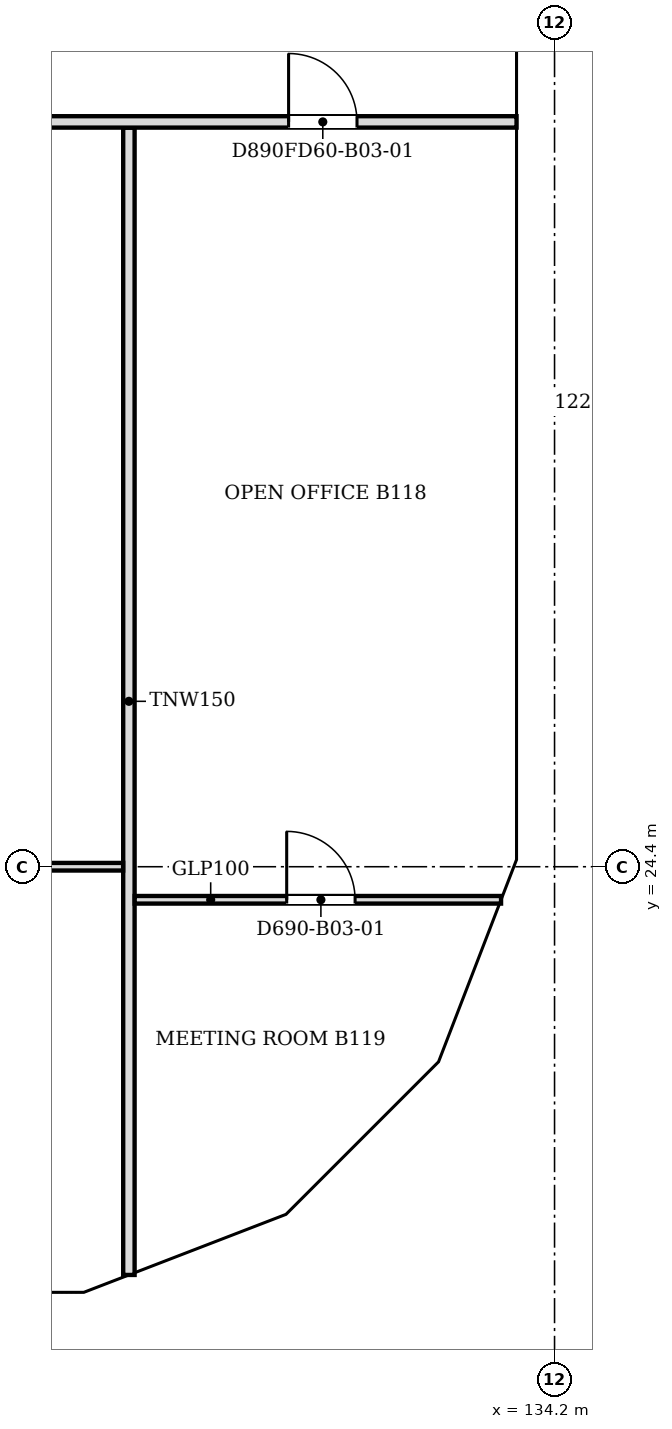
"""IFC4 building model, lengths in metres.
Left out: names, types, materials, properties, quantities, classifications, styles, units other than length and angle.
Written with IfcOpenShell. Run it as: python <this file> out.ifc"""

import sys

from ifc_helpers import new_model, si_unit, direction, frame, frame_2d, origin, place, context, subcontext, project, spatial, polyline, rectangle, outline, extrude, faceted_brep, source, transform, mapped, element, fill, save


model = new_model("IFC4")
c1 = context("Model", 3, precision=1e-05, world=origin(), true_north=direction((0.0, 1.0)))
c2 = subcontext(c1, "Body", "Model", "MODEL_VIEW")
j1 = project(units=[si_unit("LENGTHUNIT", "METRE"), si_unit("PLANEANGLEUNIT", "RADIAN")], contexts=[c1])
p1 = place(None, origin())
s1 = spatial("IfcSite", under=j1, at=p1, CompositionType="ELEMENT")
p2 = place(p1, origin())
s2 = spatial("IfcBuilding", under=s1, at=p2, CompositionType="ELEMENT")
p3 = place(p2, frame((0.0, 0.0, 25.8)))
s3 = spatial("IfcBuildingStorey", under=s2, at=p3, CompositionType="ELEMENT", Elevation=25.8)
m1 = source(origin(), c2, "Body", "Brep", [
    faceted_brep([(3.05, -0.25, 3.74), (3.003, -0.25, 3.8), (0.0, -0.25, 0.0), (3.05, -0.25, 0.0), (0.0, 0.25, 0.0), (2.957, 0.25, 3.741), (2.957, 0.25, 0.0), (3.003, 0.0, 3.8)], [[[0, 1, 2, 3]], [[4, 5, 6]], [[7, 1, 0]], [[5, 4, 2, 1, 7]], [[4, 6, 3, 2]], [[3, 6, 5, 7, 0]]]),
])
p4 = place(p3, frame((125.05, 18.55, 0.0), z_axis=(0.0, 0.0, 1.0), x_axis=(1.0, 0.0, 0.0)))
e1 = element("IfcWall", 1, at=p4, inside=s3, PredefinedType="SOLIDWALL", context=c2, shape_type="MappedRepresentation", body=[
    mapped(m1, transform((0.0, 0.0, 0.0), scale=1.0)),
])
m2 = source(origin(), c2, "Body", "SweptSolid", [
    extrude(outline(polyline([(2.803, 3.144), (0.516, 0.25), (2.803, 0.25), (2.803, 3.144)])), frame((0.0, 0.26, 0.0), z_axis=(0.0, -1.0, 0.0), x_axis=(1.0, 0.0, 0.0)), (0.0, 0.0, 1.0), 0.52),
])
p5 = place(p4, origin())
e2 = element("IfcOpeningElement", 2, at=p5, cuts=e1, PredefinedType="OPENING", context=c2, shape_type="MappedRepresentation", body=[
    mapped(m2, transform((0.0, 0.0, 0.0), scale=1.0)),
])
m3 = source(origin(), c2, "Body", "Brep", [
    faceted_brep([(2.997, -0.25, 0.0), (0.047, -0.25, 3.8), (0.0, -0.25, 3.741), (0.0, -0.25, 0.0), (0.093, 0.25, 3.74), (2.944, 0.25, 0.068), (2.944, 0.25, 0.0), (0.093, 0.25, 0.0), (0.047, 0.0, 3.8), (2.997, 0.0, 0.0)], [[[0, 1, 2, 3]], [[4, 5, 6, 7]], [[5, 4, 8, 1, 0, 9]], [[2, 1, 8]], [[7, 6, 9, 0, 3]], [[7, 3, 2, 8, 4]], [[9, 6, 5]]]),
])
p6 = place(p3, frame((128.01, 18.533, 0.0), z_axis=(0.0, 0.0, 1.0), x_axis=(0.932990326376, 0.359901446078, 0.0)))
e3 = element("IfcWall", 3, at=p6, inside=s3, PredefinedType="SOLIDWALL", context=c2, shape_type="MappedRepresentation", body=[
    mapped(m3, transform((0.0, 0.0, 0.0), scale=1.0)),
])
m4 = source(origin(), c2, "Body", "SweptSolid", [
    extrude(outline(polyline([(2.487, 0.25), (0.247, 3.135), (0.247, 0.25), (2.487, 0.25)])), frame((0.0, 0.26, 0.0), z_axis=(0.0, -1.0, 0.0), x_axis=(1.0, 0.0, 0.0)), (0.0, 0.0, 1.0), 0.52),
])
p7 = place(p6, origin())
e4 = element("IfcOpeningElement", 4, at=p7, cuts=e3, PredefinedType="OPENING", context=c2, shape_type="MappedRepresentation", body=[
    mapped(m4, transform((0.0, 0.0, 0.0), scale=1.0)),
])
m5 = source(origin(), c2, "Body", "Brep", [
    faceted_brep([(2.997, -0.25, 3.732), (2.944, -0.25, 3.8), (0.0, -0.25, 0.0), (2.997, -0.25, 0.0), (0.053, 0.25, 0.068), (2.891, 0.25, 3.732), (2.891, 0.25, 0.0), (0.053, 0.25, 0.0), (2.944, 0.0, 3.8), (0.0, 0.0, 0.0)], [[[0, 1, 2, 3]], [[4, 5, 6, 7]], [[8, 1, 0]], [[5, 4, 9, 2, 1, 8]], [[7, 6, 3, 2, 9]], [[7, 9, 4]], [[3, 6, 5, 8, 0]]]),
])
p8 = place(p3, frame((130.806, 19.612, 0.0), z_axis=(0.0, 0.0, 1.0), x_axis=(0.707106781187, 0.707106781187, 0.0)))
e5 = element("IfcWall", 5, at=p8, inside=s3, PredefinedType="SOLIDWALL", context=c2, shape_type="MappedRepresentation", body=[
    mapped(m5, transform((0.0, 0.0, 0.0), scale=1.0)),
])
m6 = source(origin(), c2, "Body", "SweptSolid", [
    extrude(outline(polyline([(2.744, 3.134), (0.51, 0.25), (2.744, 0.25), (2.744, 3.134)])), frame((0.0, 0.26, 0.0), z_axis=(0.0, -1.0, 0.0), x_axis=(1.0, 0.0, 0.0)), (0.0, 0.0, 1.0), 0.52),
])
p9 = place(p8, origin())
e6 = element("IfcOpeningElement", 6, at=p9, cuts=e5, PredefinedType="OPENING", context=c2, shape_type="MappedRepresentation", body=[
    mapped(m6, transform((0.0, 0.0, 0.0), scale=1.0)),
])
m7 = source(origin(), c2, "Body", "Brep", [
    faceted_brep([(3.003, -0.25, 0.0), (0.053, -0.25, 3.8), (0.0, -0.25, 3.732), (0.0, -0.25, 0.0), (0.106, 0.25, 3.732), (2.957, 0.25, 0.06), (2.957, 0.25, 0.0), (0.106, 0.25, 0.0), (0.053, 0.0, 3.8), (3.003, 0.0, 0.0)], [[[0, 1, 2, 3]], [[4, 5, 6, 7]], [[5, 4, 8, 1, 0, 9]], [[2, 1, 8]], [[7, 6, 9, 0, 3]], [[7, 3, 2, 8, 4]], [[9, 6, 5]]]),
])
p10 = place(p3, frame((132.869, 21.644, 0.0), z_axis=(0.0, 0.0, 1.0), x_axis=(0.359855894603, 0.933007896601, 0.0)))
e7 = element("IfcWall", 7, at=p10, inside=s3, PredefinedType="SOLIDWALL", context=c2, shape_type="MappedRepresentation", body=[
    mapped(m7, transform((0.0, 0.0, 0.0), scale=1.0)),
])
m8 = source(origin(), c2, "Body", "SweptSolid", [
    extrude(outline(polyline([(2.493, 0.25), (0.253, 3.135), (0.253, 0.25), (2.493, 0.25)])), frame((0.0, 0.26, 0.0), z_axis=(0.0, -1.0, 0.0), x_axis=(1.0, 0.0, 0.0)), (0.0, 0.0, 1.0), 0.52),
])
p11 = place(p10, origin())
e8 = element("IfcOpeningElement", 8, at=p11, cuts=e7, PredefinedType="OPENING", context=c2, shape_type="MappedRepresentation", body=[
    mapped(m8, transform((0.0, 0.0, 0.0), scale=1.0)),
])
m9 = source(origin(), c2, "Body", "Brep", [
    faceted_brep([(6.053, -0.25, 0.0), (3.003, -0.25, 3.8), (0.0, -0.25, 0.0), (0.047, 0.25, 0.059), (3.003, 0.25, 3.8), (6.053, 0.25, 0.0), (0.047, 0.25, 0.0), (0.0, 0.0, 0.0)], [[[0, 1, 2]], [[3, 4, 5, 6]], [[5, 4, 1, 0]], [[4, 3, 7, 2, 1]], [[6, 5, 0, 2, 7]], [[6, 7, 3]]]),
])
p12 = place(p3, frame((133.95, 24.447, 0.0), z_axis=(0.0, 0.0, 1.0), x_axis=(0.0, 1.0, 0.0)))
e9 = element("IfcWall", 9, at=p12, inside=s3, PredefinedType="SOLIDWALL", context=c2, shape_type="MappedRepresentation", body=[
    mapped(m9, transform((0.0, 0.0, 0.0), scale=1.0)),
])
m10 = source(origin(), c2, "Body", "SweptSolid", [
    extrude(outline(polyline([(5.532, 0.25), (3.005, 3.399), (0.516, 0.25), (5.532, 0.25)])), frame((0.0, 0.26, 0.0), z_axis=(0.0, -1.0, 0.0), x_axis=(1.0, 0.0, 0.0)), (0.0, 0.0, 1.0), 0.52),
])
p13 = place(p12, origin())
e10 = element("IfcOpeningElement", 10, at=p13, cuts=e9, PredefinedType="OPENING", context=c2, shape_type="MappedRepresentation", body=[
    mapped(m10, transform((0.0, 0.0, 0.0), scale=1.0)),
])
m11 = source(origin(), c2, "Body", "SweptSolid", [
    extrude(outline(polyline([(6.1, 0.0), (3.05, 3.8), (0.0, 0.0), (6.1, 0.0)])), frame((0.0, 0.25, 0.0), z_axis=(0.0, -1.0, 0.0), x_axis=(1.0, 0.0, 0.0)), (0.0, 0.0, 1.0), 0.5),
])
p14 = place(p3, frame((133.95, 30.5, 0.0), z_axis=(0.0, 0.0, 1.0), x_axis=(0.0, 1.0, 0.0)))
e11 = element("IfcWall", 11, at=p14, inside=s3, PredefinedType="SOLIDWALL", context=c2, shape_type="MappedRepresentation", body=[
    mapped(m11, transform((0.0, 0.0, 0.0), scale=1.0)),
])
m12 = source(origin(), c2, "Body", "SweptSolid", [
    extrude(outline(polyline([(5.579, 0.25), (3.05, 3.401), (0.521, 0.25), (5.579, 0.25)])), frame((0.0, 0.26, 0.0), z_axis=(0.0, -1.0, 0.0), x_axis=(1.0, 0.0, 0.0)), (0.0, 0.0, 1.0), 0.52),
])
p15 = place(p14, origin())
e12 = element("IfcOpeningElement", 12, at=p15, cuts=e11, PredefinedType="OPENING", context=c2, shape_type="MappedRepresentation", body=[
    mapped(m12, transform((0.0, 0.0, 0.0), scale=1.0)),
])
p16 = place(p2, frame((0.0, 0.0, 29.6)))
s4 = spatial("IfcBuildingStorey", under=s2, at=p16, CompositionType="ELEMENT", Elevation=29.6)
m13 = source(origin(), c2, "Body", "Brep", [
    faceted_brep([(3.05, -0.25, 0.0), (6.053, -0.25, 3.8), (3.05, -0.25, 7.6), (0.0, -0.25, 3.8), (0.0, 0.25, 3.8), (3.05, 0.25, 7.6), (6.007, 0.25, 3.859), (6.007, 0.25, 3.741), (3.05, 0.25, 0.0), (6.053, 0.0, 3.8)], [[[0, 1, 2, 3]], [[4, 5, 6, 7, 8]], [[8, 7, 9, 1, 0]], [[6, 5, 2, 1, 9]], [[5, 4, 3, 2]], [[4, 8, 0, 3]], [[7, 6, 9]]]),
])
p17 = place(p16, frame((122.0, 18.55, -3.8), z_axis=(0.0, 0.0, 1.0), x_axis=(1.0, 0.0, 0.0)))
e13 = element("IfcWall", 13, at=p17, inside=s4, PredefinedType="SOLIDWALL", context=c2, shape_type="MappedRepresentation", body=[
    mapped(m13, transform((0.0, 0.0, 0.0), scale=1.0)),
])
m14 = source(origin(), c2, "Body", "SweptSolid", [
    extrude(outline(polyline([(3.049, 0.401), (5.735, 3.8), (3.049, 7.199), (0.321, 3.8), (3.049, 0.401)])), frame((0.0, 0.26, 0.0), z_axis=(0.0, -1.0, 0.0), x_axis=(1.0, 0.0, 0.0)), (0.0, 0.0, 1.0), 0.52),
])
p18 = place(p17, origin())
e14 = element("IfcOpeningElement", 14, at=p18, cuts=e13, PredefinedType="OPENING", context=c2, shape_type="MappedRepresentation", body=[
    mapped(m14, transform((0.0, 0.0, 0.0), scale=1.0)),
])
m15 = source(origin(), c2, "Body", "Brep", [
    faceted_brep([(2.95, -0.25, 0.0), (3.003, -0.25, 0.068), (3.003, -0.25, 7.531), (2.95, -0.25, 7.6), (0.0, -0.25, 3.8), (0.047, 0.25, 3.86), (2.898, 0.25, 7.532), (2.898, 0.25, 0.068), (0.047, 0.25, 3.74), (2.95, 0.0, 0.0), (2.95, 0.0, 7.6), (0.0, 0.0, 3.8)], [[[0, 1, 2, 3, 4]], [[5, 6, 7, 8]], [[1, 0, 9]], [[10, 3, 2]], [[6, 5, 11, 4, 3, 10]], [[8, 7, 9, 0, 4, 11]], [[8, 11, 5]], [[1, 9, 7, 6, 10, 2]]]),
])
p19 = place(p16, frame((128.053, 18.55, -3.8), z_axis=(0.0, 0.0, 1.0), x_axis=(0.933007896601, 0.359855894603, 0.0)))
e15 = element("IfcWall", 15, at=p19, inside=s4, PredefinedType="SOLIDWALL", context=c2, shape_type="MappedRepresentation", body=[
    mapped(m15, transform((0.0, 0.0, 0.0), scale=1.0)),
])
m16 = source(origin(), c2, "Body", "SweptSolid", [
    extrude(outline(polyline([(2.75, 6.935), (0.316, 3.8), (2.75, 0.665), (2.75, 6.935)])), frame((0.0, 0.26, 0.0), z_axis=(0.0, -1.0, 0.0), x_axis=(1.0, 0.0, 0.0)), (0.0, 0.0, 1.0), 0.52),
])
p20 = place(p19, origin())
e16 = element("IfcOpeningElement", 16, at=p20, cuts=e15, PredefinedType="OPENING", context=c2, shape_type="MappedRepresentation", body=[
    mapped(m16, transform((0.0, 0.0, 0.0), scale=1.0)),
])
m17 = source(origin(), c2, "Body", "Brep", [
    faceted_brep([(0.053, -0.25, 0.0), (2.997, -0.25, 3.8), (0.053, -0.25, 7.6), (0.0, -0.25, 7.532), (0.0, -0.25, 0.068), (0.106, 0.25, 7.531), (2.944, 0.25, 3.868), (2.944, 0.25, 3.732), (0.106, 0.25, 0.068), (2.997, 0.0, 3.8), (0.053, 0.0, 0.0), (0.053, 0.0, 7.6)], [[[0, 1, 2, 3, 4]], [[5, 6, 7, 8]], [[8, 7, 9, 1, 0, 10]], [[6, 5, 11, 2, 1, 9]], [[3, 2, 11]], [[10, 0, 4]], [[8, 10, 4, 3, 11, 5]], [[7, 6, 9]]]),
])
p21 = place(p16, frame((130.769, 19.574, -3.8), z_axis=(0.0, 0.0, 1.0), x_axis=(0.707106781187, 0.707106781187, 0.0)))
e17 = element("IfcWall", 17, at=p21, inside=s4, PredefinedType="SOLIDWALL", context=c2, shape_type="MappedRepresentation", body=[
    mapped(m17, transform((0.0, 0.0, 0.0), scale=1.0)),
])
m18 = source(origin(), c2, "Body", "SweptSolid", [
    extrude(outline(polyline([(0.253, 0.666), (2.681, 3.8), (0.253, 6.934), (0.253, 0.666)])), frame((0.0, 0.26, 0.0), z_axis=(0.0, -1.0, 0.0), x_axis=(1.0, 0.0, 0.0)), (0.0, 0.0, 1.0), 0.52),
])
p22 = place(p21, origin())
e18 = element("IfcOpeningElement", 18, at=p22, cuts=e17, PredefinedType="OPENING", context=c2, shape_type="MappedRepresentation", body=[
    mapped(m18, transform((0.0, 0.0, 0.0), scale=1.0)),
])
m19 = source(origin(), c2, "Body", "Brep", [
    faceted_brep([(2.95, -0.25, 0.0), (2.997, -0.25, 0.059), (2.997, -0.25, 7.541), (2.95, -0.25, 7.6), (0.0, -0.25, 3.8), (0.053, 0.25, 3.868), (2.904, 0.25, 7.54), (2.904, 0.25, 0.06), (0.053, 0.25, 3.732), (2.95, 0.0, 0.0), (2.95, 0.0, 7.6), (0.0, 0.0, 3.8)], [[[0, 1, 2, 3, 4]], [[5, 6, 7, 8]], [[1, 0, 9]], [[10, 3, 2]], [[6, 5, 11, 4, 3, 10]], [[8, 7, 9, 0, 4, 11]], [[8, 11, 5]], [[1, 9, 7, 6, 10, 2]]]),
])
p23 = place(p16, frame((132.888, 21.694, -3.8), z_axis=(0.0, 0.0, 1.0), x_axis=(0.359901446078, 0.932990326376, 0.0)))
e19 = element("IfcWall", 19, at=p23, inside=s4, PredefinedType="SOLIDWALL", context=c2, shape_type="MappedRepresentation", body=[
    mapped(m19, transform((0.0, 0.0, 0.0), scale=1.0)),
])
p24 = place(p23, origin())
e20 = element("IfcOpeningElement", 20, at=p24, cuts=e19, PredefinedType="OPENING", context=c2, shape_type="MappedRepresentation", body=[
    mapped(m16, transform((0.0, 0.0, 0.0), scale=1.0)),
])
m20 = source(origin(), c2, "Body", "Brep", [
    faceted_brep([(0.047, -0.25, 0.0), (3.05, -0.25, 3.8), (0.047, -0.25, 7.6), (0.0, -0.25, 7.54), (0.0, -0.25, 0.06), (0.093, 0.25, 7.541), (3.05, 0.25, 3.8), (0.093, 0.25, 0.059), (0.047, 0.0, 0.0), (0.047, 0.0, 7.6)], [[[0, 1, 2, 3, 4]], [[5, 6, 7]], [[7, 6, 1, 0, 8]], [[6, 5, 9, 2, 1]], [[3, 2, 9]], [[8, 0, 4]], [[7, 8, 4, 3, 9, 5]]]),
])
p25 = place(p16, frame((133.95, 24.4, -3.8), z_axis=(0.0, 0.0, 1.0), x_axis=(0.0, 1.0, 0.0)))
e21 = element("IfcWall", 21, at=p25, inside=s4, PredefinedType="SOLIDWALL", context=c2, shape_type="MappedRepresentation", body=[
    mapped(m20, transform((0.0, 0.0, 0.0), scale=1.0)),
])
m21 = source(origin(), c2, "Body", "SweptSolid", [
    extrude(outline(polyline([(0.247, 0.656), (2.731, 3.8), (0.247, 6.944), (0.247, 0.656)])), frame((0.0, 0.26, 0.0), z_axis=(0.0, -1.0, 0.0), x_axis=(1.0, 0.0, 0.0)), (0.0, 0.0, 1.0), 0.52),
])
p26 = place(p25, origin())
e22 = element("IfcOpeningElement", 22, at=p26, cuts=e21, PredefinedType="OPENING", context=c2, shape_type="MappedRepresentation", body=[
    mapped(m21, transform((0.0, 0.0, 0.0), scale=1.0)),
])
m22 = source(origin(), c2, "Body", "SweptSolid", [
    extrude(outline(polyline([(3.05, 0.0), (6.1, 3.8), (3.05, 7.6), (0.0, 3.8), (3.05, 0.0)])), frame((0.0, 0.25, 0.0), z_axis=(0.0, -1.0, 0.0), x_axis=(1.0, 0.0, 0.0)), (0.0, 0.0, 1.0), 0.5),
])
p27 = place(p16, frame((133.95, 27.45, -3.8), z_axis=(0.0, 0.0, 1.0), x_axis=(0.0, 1.0, 0.0)))
e23 = element("IfcWall", 23, at=p27, inside=s4, PredefinedType="SOLIDWALL", context=c2, shape_type="MappedRepresentation", body=[
    mapped(m22, transform((0.0, 0.0, 0.0), scale=1.0)),
])
m23 = source(origin(), c2, "Body", "SweptSolid", [
    extrude(outline(polyline([(3.05, 0.399), (5.78, 3.8), (3.05, 7.2), (0.321, 3.8), (3.05, 0.399)])), frame((0.0, 0.26, 0.0), z_axis=(0.0, -1.0, 0.0), x_axis=(1.0, 0.0, 0.0)), (0.0, 0.0, 1.0), 0.52),
])
p28 = place(p27, origin())
e24 = element("IfcOpeningElement", 24, at=p28, cuts=e23, PredefinedType="OPENING", context=c2, shape_type="MappedRepresentation", body=[
    mapped(m23, transform((0.0, 0.0, 0.0), scale=1.0)),
])
m24 = source(origin(), c2, "Body", "Brep", [
    faceted_brep([(3.05, -0.25, 0.0), (6.1, -0.25, 3.8), (6.1, -0.25, 3.8), (3.05, -0.25, 7.6), (0.0, -0.25, 3.8), (0.0, 0.25, 3.8), (3.05, 0.25, 7.6), (6.1, 0.25, 3.8), (6.1, 0.25, 3.8), (3.05, 0.25, 0.0)], [[[0, 1, 2, 3, 4]], [[5, 6, 7, 8, 9]], [[9, 8, 1, 0]], [[7, 6, 3, 2]], [[6, 5, 4, 3]], [[5, 9, 0, 4]], [[1, 8, 7, 2]]]),
])
p29 = place(p16, frame((133.95, 33.55, -3.8), z_axis=(0.0, 0.0, 1.0), x_axis=(0.0, 1.0, 0.0)))
e25 = element("IfcWall", 25, at=p29, inside=s4, PredefinedType="SOLIDWALL", context=c2, shape_type="MappedRepresentation", body=[
    mapped(m24, transform((0.0, 0.0, 0.0), scale=1.0)),
])
p30 = place(p29, origin())
e26 = element("IfcOpeningElement", 26, at=p30, cuts=e25, PredefinedType="OPENING", context=c2, shape_type="MappedRepresentation", body=[
    mapped(m23, transform((0.0, 0.0, 0.0), scale=1.0)),
])
p31 = place(p3, frame((128.6, 19.029, 0.0), z_axis=(0.0, 0.0, 1.0), x_axis=(0.0, 1.0, 0.0)))
e27 = element("IfcWall", 27, at=p31, inside=s3, PredefinedType="PARTITIONING", context=c2, shape_type="SweptSolid", body=[
    extrude(rectangle(XDim=15.095, YDim=0.15, at=frame_2d((7.548, 0.0))), origin(), (0.0, 0.0, 1.0), 3.067),
])
p32 = place(p3, frame((133.496, 23.965, 0.0), z_axis=(0.0, 0.0, 1.0), x_axis=(-1.0, 0.0, 0.0)))
e28 = element("IfcWall", 28, at=p32, inside=s3, PredefinedType="PARTITIONING", context=c2, shape_type="SweptSolid", body=[
    extrude(rectangle(XDim=4.82, YDim=0.1, at=frame_2d((2.41, 0.0))), origin(), (0.0, 0.0, 1.0), 3.067),
])
m25 = source(origin(), c2, "Body", "SweptSolid", [
    extrude(rectangle(XDim=0.9, YDim=2.1, at=frame_2d((0.45, 1.05))), frame((0.0, 0.06, 0.0), z_axis=(0.0, -1.0, 0.0), x_axis=(1.0, 0.0, 0.0)), (0.0, 0.0, 1.0), 0.12),
])
p33 = place(p32, frame((1.92, 0.0, 0.0)))
e29 = element("IfcOpeningElement", 29, at=p33, cuts=e28, PredefinedType="OPENING", context=c2, shape_type="MappedRepresentation", body=[
    mapped(m25, transform((0.0, 0.0, 0.0), scale=1.0)),
])
p34 = place(p3, frame((128.524, 24.4, 0.0), z_axis=(0.0, 0.0, 1.0), x_axis=(-1.0, 0.0, 0.0)))
e30 = element("IfcWall", 30, at=p34, inside=s3, PredefinedType="PARTITIONING", context=c2, shape_type="SweptSolid", body=[
    extrude(rectangle(XDim=4.603, YDim=0.1, at=frame_2d((2.301, 0.0))), origin(), (0.0, 0.0, 1.0), 3.067),
])
p35 = place(p34, frame((1.803, 0.0, 0.0)))
e31 = element("IfcOpeningElement", 31, at=p35, cuts=e30, PredefinedType="OPENING", context=c2, shape_type="MappedRepresentation", body=[
    mapped(m25, transform((0.0, 0.0, 0.0), scale=1.0)),
])
p36 = place(p3, frame((133.7, 34.2, 0.0), z_axis=(0.0, 0.0, 1.0), x_axis=(-1.0, 0.0, 0.0)))
e32 = element("IfcWall", 32, at=p36, inside=s3, PredefinedType="PARTITIONING", context=c2, shape_type="SweptSolid", body=[
    extrude(rectangle(XDim=47.8, YDim=0.15, at=frame_2d((23.9, 0.0))), origin(), (0.0, 0.0, 1.0), 3.067),
])
m26 = source(origin(), c2, "Body", "SweptSolid", [
    extrude(rectangle(XDim=0.9, YDim=2.1, at=frame_2d((0.45, 1.05))), frame((0.0, 0.085, 0.0), z_axis=(0.0, -1.0, 0.0), x_axis=(1.0, 0.0, 0.0)), (0.0, 0.0, 1.0), 0.17),
])
p37 = place(p36, frame((2.099, 0.0, 0.0)))
e33 = element("IfcOpeningElement", 33, at=p37, cuts=e32, PredefinedType="OPENING", context=c2, shape_type="MappedRepresentation", body=[
    mapped(m26, transform((0.0, 0.0, 0.0), scale=1.0)),
])
m27 = source(origin(), c2, "Body", "SweptSolid", [
    extrude(rectangle(XDim=1.0, YDim=2.1, at=frame_2d((0.5, 1.05))), frame((0.0, 0.085, 0.0), z_axis=(0.0, -1.0, 0.0), x_axis=(1.0, 0.0, 0.0)), (0.0, 0.0, 1.0), 0.17),
])
p38 = place(p36, frame((26.199, 0.0, 0.0)))
e34 = element("IfcOpeningElement", 34, at=p38, cuts=e32, PredefinedType="OPENING", context=c2, shape_type="MappedRepresentation", body=[
    mapped(m27, transform((0.0, 0.0, 0.0), scale=1.0)),
])
p39 = place(p36, frame((44.3, 0.0, 0.0)))
e35 = element("IfcOpeningElement", 35, at=p39, cuts=e32, PredefinedType="OPENING", context=c2, shape_type="MappedRepresentation", body=[
    mapped(m26, transform((0.0, 0.0, 0.0), scale=1.0)),
])
p40 = place(p36, frame((9.249, 0.0, 0.0)))
e36 = element("IfcOpeningElement", 36, at=p40, cuts=e32, PredefinedType="OPENING", context=c2, shape_type="MappedRepresentation", body=[
    mapped(m26, transform((0.0, 0.0, 0.0), scale=1.0)),
])
p41 = place(p36, frame((18.6, 0.0, 0.0)))
e37 = element("IfcOpeningElement", 37, at=p41, cuts=e32, PredefinedType="OPENING", context=c2, shape_type="MappedRepresentation", body=[
    mapped(m27, transform((0.0, 0.0, 0.0), scale=1.0)),
])
p42 = place(p36, frame((35.1, 0.0, 0.0)))
e38 = element("IfcOpeningElement", 38, at=p42, cuts=e32, PredefinedType="OPENING", context=c2, shape_type="MappedRepresentation", body=[
    mapped(m27, transform((0.0, 0.0, 0.0), scale=1.0)),
])
m28 = source(origin(), c2, "Body", "SweptSolid", [
    extrude(rectangle(XDim=0.9, YDim=2.1, at=frame_2d((0.45, 1.05))), frame((0.0, 0.025, 0.0), z_axis=(0.0, -1.0, 0.0), x_axis=(1.0, 0.0, 0.0)), (0.0, 0.0, 1.0), 0.05),
])
p43 = place(p33, origin())
e39 = element("IfcDoor", 39, at=p43, inside=s3, OperationType="SINGLE_SWING_RIGHT", PredefinedType="DOOR", context=c2, shape_type="MappedRepresentation", body=[
    mapped(m28, transform((0.0, 0.0, 0.0), scale=1.0)),
])
fill(e29, e39)
p44 = place(p37, origin())
e40 = element("IfcDoor", 40, at=p44, inside=s3, OperationType="SINGLE_SWING_RIGHT", PredefinedType="DOOR", context=c2, shape_type="MappedRepresentation", body=[
    mapped(m28, transform((0.0, 0.0, 0.0), scale=1.0)),
])
fill(e33, e40)
save(model, sys.argv[1])
